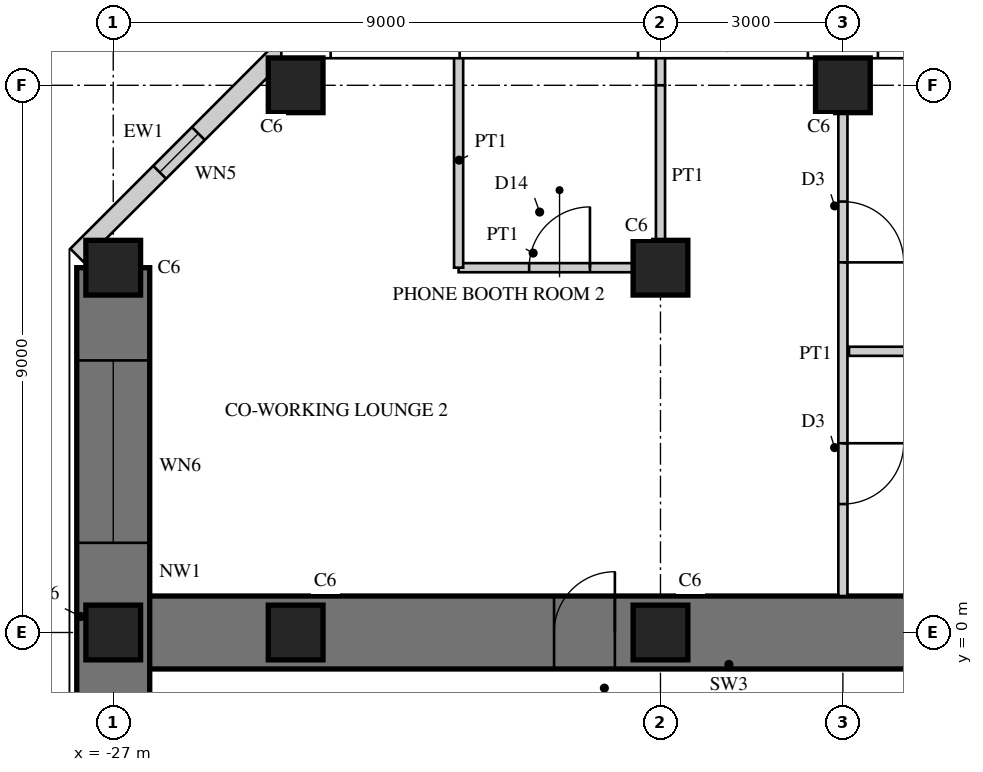
"""IFC4 building model, lengths in metres.
Left out: names, types, materials, properties, quantities, classifications, styles, units other than length and angle.
Written with IfcOpenShell. Run it as: python <this file> out.ifc"""

import sys

from ifc_helpers import new_model, si_unit, direction, frame, frame_2d, origin, origin_2d, place, context, subcontext, project, spatial, rectangle, hollow_rectangle, extrude, element, fill, save


model = new_model("IFC4")
c1 = context("Model", 3, precision=1e-05, world=origin(), true_north=direction((0.0, 1.0)))
c2 = subcontext(c1, "Body", "Model", "MODEL_VIEW")
j1 = project(units=[si_unit("LENGTHUNIT", "METRE"), si_unit("PLANEANGLEUNIT", "RADIAN")], contexts=[c1])
p1 = place(None, origin())
s1 = spatial("IfcSite", under=j1, at=p1, CompositionType="ELEMENT")
p2 = place(p1, origin())
s2 = spatial("IfcBuilding", under=s1, at=p2, CompositionType="ELEMENT")
p3 = place(p2, frame((0.0, 0.0, 217.1)))
s3 = spatial("IfcBuildingStorey", under=s2, at=p3, CompositionType="ELEMENT", Elevation=217.1)
p4 = place(p3, frame((-9.0, 0.0, 0.0), z_axis=(0.0, 0.0, 1.0), x_axis=(-1.0, 0.0, 0.0)))
e1 = element("IfcWall", 1, at=p4, inside=s3, PredefinedType="SHEAR", context=c2, shape_type="SweptSolid", body=[
    extrude(rectangle(XDim=18.0, YDim=1.2, at=frame_2d((9.0, 0.0))), origin(), (0.0, 0.0, 1.0), 5.0),
])
p5 = place(p4, frame((9.75, 0.0, 0.0)))
e2 = element("IfcOpeningElement", 2, at=p5, cuts=e1, PredefinedType="OPENING", context=c2, shape_type="SweptSolid", body=[
    extrude(rectangle(XDim=1.0, YDim=2.2, at=frame_2d((0.5, 1.1))), frame((0.0, 0.61, 0.0), z_axis=(0.0, -1.0, 0.0), x_axis=(1.0, 0.0, 0.0)), (0.0, 0.0, 1.0), 1.22),
])
p6 = place(p3, frame((-27.0, 6.0, 0.0), z_axis=(0.0, 0.0, 1.0), x_axis=(0.0, -1.0, 0.0)))
e3 = element("IfcWall", 3, at=p6, inside=s3, PredefinedType="SHEAR", context=c2, shape_type="SweptSolid", body=[
    extrude(rectangle(XDim=12.0, YDim=1.2, at=frame_2d((6.0, 0.0))), origin(), (0.0, 0.0, 1.0), 5.0),
])
p7 = place(p6, frame((1.525, 0.0, 0.6)))
e4 = element("IfcOpeningElement", 4, at=p7, cuts=e3, PredefinedType="OPENING", context=c2, shape_type="SweptSolid", body=[
    extrude(rectangle(XDim=3.0, YDim=2.4, at=frame_2d((1.5, 1.2))), frame((0.0, 0.61, 0.0), z_axis=(0.0, -1.0, 0.0), x_axis=(1.0, 0.0, 0.0)), (0.0, 0.0, 1.0), 1.22),
])
p8 = place(p6, frame((7.475, 0.0, 0.6)))
e5 = element("IfcOpeningElement", 5, at=p8, cuts=e3, PredefinedType="OPENING", context=c2, shape_type="SweptSolid", body=[
    extrude(rectangle(XDim=3.0, YDim=2.4, at=frame_2d((1.5, 1.2))), frame((0.0, 0.61, 0.0), z_axis=(0.0, -1.0, 0.0), x_axis=(1.0, 0.0, 0.0)), (0.0, 0.0, 1.0), 1.22),
])
for number, where, z_axis, x_axis in (
    (6, (-15.0, 9.0, 0.0), (0.0, 0.0, 1.0), (1.0, 0.0, 0.0)),
    (7, (-24.0, 9.0, 0.0), (0.0, 0.0, 1.0), (1.0, 0.0, 0.0)),
    (8, (-27.0, 6.0, 0.0), (0.0, 0.0, 1.0), (1.0, 0.0, 0.0)),
    (9, (-27.0, 0.0, 0.0), (0.0, 0.0, 1.0), (1.0, 0.0, 0.0)),
    (10, (-18.0, 6.0, 0.0), (0.0, 0.0, 1.0), (1.0, 0.0, 0.0)),
    (11, (-18.0, 0.0, 0.0), (0.0, 0.0, 1.0), (1.0, 0.0, 0.0)),
    (12, (-24.0, 0.0, 0.0), (0.0, 0.0, 1.0), (1.0, 0.0, 0.0)),
):
    element("IfcColumn", number, at=place(p3, frame(where, z_axis=z_axis, x_axis=x_axis)), inside=s3, PredefinedType="COLUMN", context=c2, shape_type="SweptSolid", body=[
        extrude(rectangle(XDim=0.9, YDim=0.9, at=origin_2d()), origin(), (0.0, 0.0, 1.0), 5.0),
    ])
p9 = place(p3, frame((-24.236, 9.57, 0.0), z_axis=(0.0, 0.0, 1.0), x_axis=(-0.707106781187, -0.707106781187, 0.0)))
e13 = element("IfcWall", 13, at=p9, inside=s3, PredefinedType="SOLIDWALL", context=c2, shape_type="SweptSolid", body=[
    extrude(rectangle(XDim=4.757, YDim=0.3, at=frame_2d((2.379, 0.0))), origin(), (0.0, 0.0, 1.0), 4.82),
])
p10 = place(p9, frame((1.929, 0.0, 0.3)))
e14 = element("IfcOpeningElement", 14, at=p10, cuts=e13, PredefinedType="OPENING", context=c2, shape_type="SweptSolid", body=[
    extrude(rectangle(XDim=0.9, YDim=2.4, at=frame_2d((0.45, 1.2))), frame((0.0, 0.16, 0.0), z_axis=(0.0, -1.0, 0.0), x_axis=(1.0, 0.0, 0.0)), (0.0, 0.0, 1.0), 0.32),
])
p11 = place(p3, frame((-15.0, 8.55, 0.0), z_axis=(0.0, 0.0, 1.0), x_axis=(0.0, -1.0, 0.0)))
e15 = element("IfcWall", 15, at=p11, inside=s3, PredefinedType="PARTITIONING", context=c2, shape_type="SweptSolid", body=[
    extrude(rectangle(XDim=7.95, YDim=0.15, at=frame_2d((3.975, 0.0))), origin(), (0.0, 0.0, 1.0), 4.07),
])
p12 = place(p11, frame((1.462, 0.0, 0.0)))
e16 = element("IfcOpeningElement", 16, at=p12, cuts=e15, PredefinedType="OPENING", context=c2, shape_type="SweptSolid", body=[
    extrude(rectangle(XDim=1.0, YDim=2.1, at=frame_2d((0.5, 1.05))), frame((0.0, 0.085, 0.0), z_axis=(0.0, -1.0, 0.0), x_axis=(1.0, 0.0, 0.0)), (0.0, 0.0, 1.0), 0.17),
])
p13 = place(p11, frame((5.438, 0.0, 0.0)))
e17 = element("IfcOpeningElement", 17, at=p13, cuts=e15, PredefinedType="OPENING", context=c2, shape_type="SweptSolid", body=[
    extrude(rectangle(XDim=1.0, YDim=2.1, at=frame_2d((0.5, 1.05))), frame((0.0, 0.085, 0.0), z_axis=(0.0, -1.0, 0.0), x_axis=(1.0, 0.0, 0.0)), (0.0, 0.0, 1.0), 0.17),
])
p14 = place(p3, frame((-9.55, 4.625, 0.0), z_axis=(0.0, 0.0, 1.0), x_axis=(-1.0, 0.0, 0.0)))
e18 = element("IfcWall", 18, at=p14, inside=s3, PredefinedType="PARTITIONING", context=c2, shape_type="SweptSolid", body=[
    extrude(rectangle(XDim=5.35, YDim=0.15, at=frame_2d((2.675, 0.0))), origin(), (0.0, 0.0, 1.0), 4.82),
])
p15 = place(p3, frame((-18.0, 6.0, 0.0), z_axis=(0.0, 0.0, 1.0), x_axis=(-1.0, 0.0, 0.0)))
e19 = element("IfcWall", 19, at=p15, inside=s3, PredefinedType="PARTITIONING", context=c2, shape_type="SweptSolid", body=[
    extrude(rectangle(XDim=3.32, YDim=0.15, at=frame_2d((1.66, 0.0))), origin(), (0.0, 0.0, 1.0), 4.17),
])
p16 = place(p15, frame((1.16, 0.0, 0.0)))
e20 = element("IfcOpeningElement", 20, at=p16, cuts=e19, PredefinedType="OPENING", context=c2, shape_type="SweptSolid", body=[
    extrude(rectangle(XDim=1.0, YDim=2.2, at=frame_2d((0.5, 1.1))), frame((0.0, 0.085, 0.0), z_axis=(0.0, -1.0, 0.0), x_axis=(1.0, 0.0, 0.0)), (0.0, 0.0, 1.0), 0.17),
])
p17 = place(p3, frame((-18.0, 9.53, 0.0), z_axis=(0.0, 0.0, 1.0), x_axis=(0.0, -1.0, 0.0)))
e21 = element("IfcWall", 21, at=p17, inside=s3, PredefinedType="PARTITIONING", context=c2, shape_type="SweptSolid", body=[
    extrude(rectangle(XDim=0.53, YDim=0.15, at=frame_2d((0.265, 0.0))), origin(), (0.0, 0.0, 1.0), 4.82),
])
p18 = place(p3, frame((-18.0, 9.0, 0.0), z_axis=(0.0, 0.0, 1.0), x_axis=(0.0, -1.0, 0.0)))
e22 = element("IfcWall", 22, at=p18, inside=s3, PredefinedType="PARTITIONING", context=c2, shape_type="SweptSolid", body=[
    extrude(rectangle(XDim=3.0, YDim=0.15, at=frame_2d((1.5, 0.0))), origin(), (0.0, 0.0, 1.0), 4.07),
])
p19 = place(p3, frame((-21.32, 9.53, 0.0), z_axis=(0.0, 0.0, 1.0), x_axis=(0.0, -1.0, 0.0)))
e23 = element("IfcWall", 23, at=p19, inside=s3, PredefinedType="PARTITIONING", context=c2, shape_type="SweptSolid", body=[
    extrude(rectangle(XDim=3.53, YDim=0.15, at=frame_2d((1.765, 0.0))), origin(), (0.0, 0.0, 1.0), 4.82),
])
p20 = place(p10, origin())
e24 = element("IfcWindow", 24, at=p20, inside=s3, PartitioningType="SINGLE_PANEL", PredefinedType="WINDOW", context=c2, shape_type="SweptSolid", body=[
    extrude(hollow_rectangle(XDim=0.9, YDim=2.4, WallThickness=0.06, at=frame_2d((0.45, 1.2))), frame((0.0, 0.03, 0.0), z_axis=(0.0, -1.0, 0.0), x_axis=(1.0, 0.0, 0.0)), (0.0, 0.0, 1.0), 0.06),
    extrude(rectangle(XDim=0.779, YDim=2.279, at=frame_2d((0.45, 1.2))), frame((0.0, 0.03, 0.0), z_axis=(0.0, -1.0, 0.0), x_axis=(1.0, 0.0, 0.0)), (0.0, 0.0, 1.0), 0.06),
])
fill(e14, e24)
p21 = place(p7, origin())
e25 = element("IfcWindow", 25, at=p21, inside=s3, PartitioningType="SINGLE_PANEL", PredefinedType="WINDOW", context=c2, shape_type="SweptSolid", body=[
    extrude(hollow_rectangle(XDim=3.0, YDim=2.4, WallThickness=0.06, at=frame_2d((1.5, 1.2))), frame((0.0, 0.03, 0.0), z_axis=(0.0, -1.0, 0.0), x_axis=(1.0, 0.0, 0.0)), (0.0, 0.0, 1.0), 0.06),
    extrude(rectangle(XDim=2.879, YDim=2.279, at=frame_2d((1.5, 1.2))), frame((0.0, 0.03, 0.0), z_axis=(0.0, -1.0, 0.0), x_axis=(1.0, 0.0, 0.0)), (0.0, 0.0, 1.0), 0.06),
])
fill(e4, e25)
p22 = place(p12, origin())
e26 = element("IfcDoor", 26, at=p22, inside=s3, OperationType="SINGLE_SWING_RIGHT", PredefinedType="DOOR", context=c2, shape_type="SweptSolid", body=[
    extrude(rectangle(XDim=1.0, YDim=2.1, at=frame_2d((0.5, 1.05))), frame((0.0, 0.025, 0.0), z_axis=(0.0, -1.0, 0.0), x_axis=(1.0, 0.0, 0.0)), (0.0, 0.0, 1.0), 0.05),
])
fill(e16, e26)
p23 = place(p13, origin())
e27 = element("IfcDoor", 27, at=p23, inside=s3, OperationType="SINGLE_SWING_LEFT", PredefinedType="DOOR", context=c2, shape_type="SweptSolid", body=[
    extrude(rectangle(XDim=1.0, YDim=2.1, at=frame_2d((0.5, 1.05))), frame((0.0, 0.025, 0.0), z_axis=(0.0, -1.0, 0.0), x_axis=(1.0, 0.0, 0.0)), (0.0, 0.0, 1.0), 0.05),
])
fill(e17, e27)
p24 = place(p16, frame((1.0, 0.0, 0.0), z_axis=(0.0, 0.0, 1.0), x_axis=(-1.0, 0.0, 0.0)))
e28 = element("IfcDoor", 28, at=p24, inside=s3, OperationType="SINGLE_SWING_RIGHT", PredefinedType="DOOR", context=c2, shape_type="SweptSolid", body=[
    extrude(rectangle(XDim=1.0, YDim=2.2, at=frame_2d((0.5, 1.1))), frame((0.0, 0.025, 0.0), z_axis=(0.0, -1.0, 0.0), x_axis=(1.0, 0.0, 0.0)), (0.0, 0.0, 1.0), 0.05),
])
fill(e20, e28)
p25 = place(p5, frame((1.0, 0.0, 0.0), z_axis=(0.0, 0.0, 1.0), x_axis=(-1.0, 0.0, 0.0)))
e29 = element("IfcDoor", 29, at=p25, inside=s3, OperationType="SINGLE_SWING_RIGHT", PredefinedType="DOOR", context=c2, shape_type="SweptSolid", body=[
    extrude(rectangle(XDim=1.0, YDim=2.2, at=frame_2d((0.5, 1.1))), frame((0.0, 0.025, 0.0), z_axis=(0.0, -1.0, 0.0), x_axis=(1.0, 0.0, 0.0)), (0.0, 0.0, 1.0), 0.05),
])
fill(e2, e29)
save(model, sys.argv[1])
